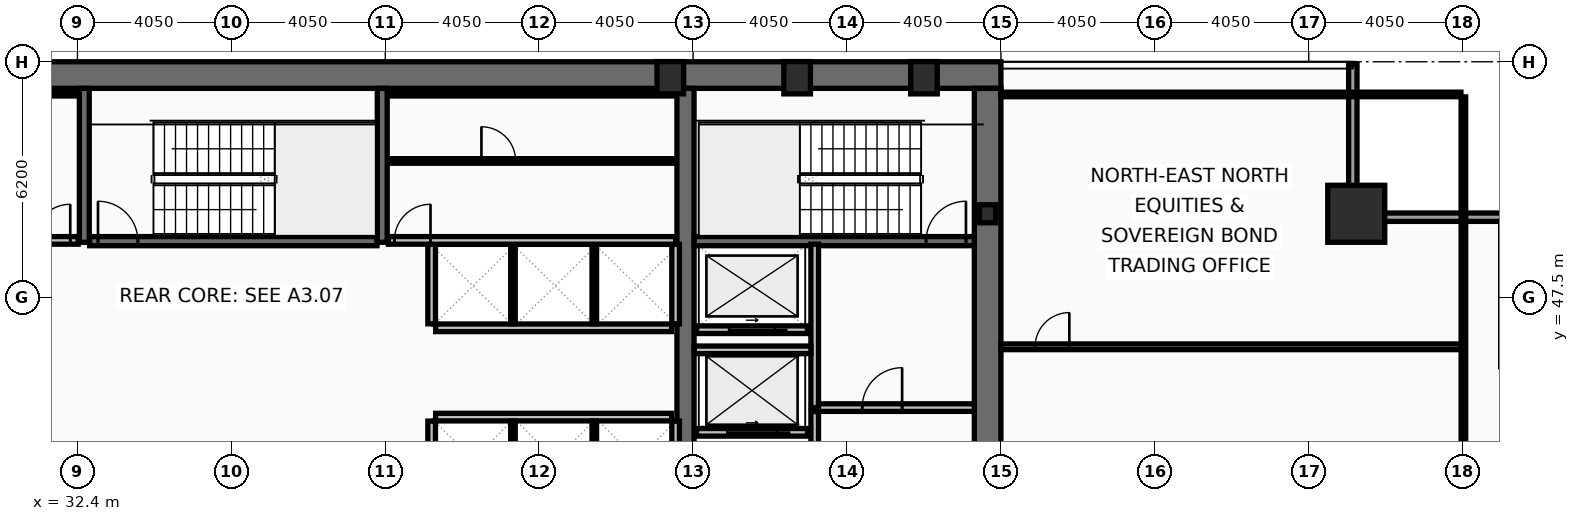
"""IFC4 building model, lengths in metres.
Left out: names, types, materials, properties, quantities, classifications, styles, units other than length and angle.
Written with IfcOpenShell. Run it as: python <this file> out.ifc"""

import sys

from ifc_helpers import new_model, si_unit, direction, frame, frame_2d, origin, origin_2d, place, context, subcontext, project, spatial, rectangle, hollow_rectangle, i_section, extrude, element, fill, save


model = new_model("IFC4")
c1 = context("Model", 3, precision=1e-05, world=origin(), true_north=direction((0.0, 1.0)))
c2 = subcontext(c1, "Body", "Model", "MODEL_VIEW")
j1 = project(units=[si_unit("LENGTHUNIT", "METRE"), si_unit("PLANEANGLEUNIT", "RADIAN")], contexts=[c1])
p1 = place(None, origin())
s1 = spatial("IfcSite", under=j1, at=p1, CompositionType="ELEMENT")
p2 = place(p1, origin())
s2 = spatial("IfcBuilding", under=s1, at=p2, CompositionType="ELEMENT")
p3 = place(p2, frame((0.0, 0.0, 90.6)))
s3 = spatial("IfcBuildingStorey", under=s2, at=p3, CompositionType="ELEMENT", Elevation=90.6)
p4 = place(p3, frame((16.2, 53.35, 0.0), z_axis=(0.0, 0.0, 1.0), x_axis=(1.0, 0.0, 0.0)))
e1 = element("IfcWall", 1, at=p4, inside=s3, PredefinedType="SHEAR", context=c2, shape_type="SweptSolid", body=[
    extrude(rectangle(XDim=40.5, YDim=0.7, at=frame_2d((20.25, 0.0))), origin(), (0.0, 0.0, 1.0), 3.82),
])
p5 = place(p3, frame((56.35, 53.0, 0.0), z_axis=(0.0, 0.0, 1.0), x_axis=(0.0, -1.0, 0.0)))
e2 = element("IfcWall", 2, at=p5, inside=s3, PredefinedType="SHEAR", context=c2, shape_type="SweptSolid", body=[
    extrude(rectangle(XDim=11.0, YDim=0.7, at=frame_2d((5.5, 0.0))), origin(), (0.0, 0.0, 1.0), 3.82),
])
p6 = place(p3, frame((48.4, 42.0, 0.0), z_axis=(0.0, 0.0, 1.0), x_axis=(0.0, 1.0, 0.0)))
e3 = element("IfcWall", 3, at=p6, inside=s3, PredefinedType="SHEAR", context=c2, shape_type="SweptSolid", body=[
    extrude(rectangle(XDim=11.0, YDim=0.45, at=frame_2d((5.5, 0.0))), origin(), (0.0, 0.0, 1.0), 3.82),
])
for number, where, z_axis, x_axis in (
    (4, (32.58, 48.95, 0.0), (0.0, 0.0, 1.0), (0.0, 1.0, 0.0)),
    (5, (40.42, 48.95, 0.0), (0.0, 0.0, 1.0), (0.0, 1.0, 0.0)),
):
    element("IfcWall", number, at=place(p3, frame(where, z_axis=z_axis, x_axis=x_axis)), inside=s3, PredefinedType="SHEAR", context=c2, shape_type="SweptSolid", body=[
        extrude(rectangle(XDim=4.05, YDim=0.26, at=frame_2d((2.025, 0.0))), origin(), (0.0, 0.0, 1.0), 3.82),
    ])
p7 = place(p3, frame((48.63, 48.98, 0.0), z_axis=(0.0, 0.0, 1.0), x_axis=(1.0, 0.0, 0.0)))
e6 = element("IfcWall", 6, at=p7, inside=s3, PredefinedType="SHEAR", context=c2, shape_type="SweptSolid", body=[
    extrude(rectangle(XDim=7.37, YDim=0.24, at=frame_2d((3.685, 0.0))), origin(), (0.0, 0.0, 1.0), 3.82),
])
p8 = place(p7, frame((6.1, 0.0, 0.0)))
e7 = element("IfcOpeningElement", 7, at=p8, cuts=e6, PredefinedType="OPENING", context=c2, shape_type="SweptSolid", body=[
    extrude(rectangle(XDim=1.05, YDim=2.15, at=frame_2d((0.525, 1.075))), frame((0.0, 0.13, 0.0), z_axis=(0.0, -1.0, 0.0), x_axis=(1.0, 0.0, 0.0)), (0.0, 0.0, 1.0), 0.26),
])
p9 = place(p3, frame((32.72, 48.98, 0.0), z_axis=(0.0, 0.0, 1.0), x_axis=(1.0, 0.0, 0.0)))
e8 = element("IfcWall", 8, at=p9, inside=s3, PredefinedType="SHEAR", context=c2, shape_type="SweptSolid", body=[
    extrude(rectangle(XDim=7.56, YDim=0.24, at=frame_2d((3.78, 0.0))), origin(), (0.0, 0.0, 1.0), 3.82),
])
p10 = place(p9, frame((0.22, 0.0, 0.0)))
e9 = element("IfcOpeningElement", 9, at=p10, cuts=e8, PredefinedType="OPENING", context=c2, shape_type="SweptSolid", body=[
    extrude(rectangle(XDim=1.05, YDim=2.15, at=frame_2d((0.525, 1.075))), frame((0.0, 0.13, 0.0), z_axis=(0.0, -1.0, 0.0), x_axis=(1.0, 0.0, 0.0)), (0.0, 0.0, 1.0), 0.26),
])
p11 = place(p3, frame((66.05, 49.7, 0.0), z_axis=(0.0, 0.0, 1.0), x_axis=(1.0, 0.0, 0.0)))
e10 = element("IfcColumn", 10, at=p11, inside=s3, PredefinedType="COLUMN", context=c2, shape_type="SweptSolid", body=[
    extrude(hollow_rectangle(XDim=1.5, YDim=1.5, WallThickness=0.07, at=origin_2d()), origin(), (0.0, 0.0, 1.0), 4.0),
])
for number, where, z_axis, x_axis in (
    (11, (48.0, 53.28, 0.0), (0.0, 0.0, 1.0), (1.0, 0.0, 0.0)),
    (12, (51.337, 53.28, 0.0), (0.0, 0.0, 1.0), (1.0, 0.0, 0.0)),
    (13, (54.675, 53.28, 0.0), (0.0, 0.0, 1.0), (1.0, 0.0, 0.0)),
):
    element("IfcColumn", number, at=place(p3, frame(where, z_axis=z_axis, x_axis=x_axis)), inside=s3, PredefinedType="COLUMN", context=c2, shape_type="SweptSolid", body=[
        extrude(hollow_rectangle(XDim=0.7, YDim=0.85, WallThickness=0.05, at=origin_2d()), origin(), (0.0, 0.0, 1.0), 4.0),
    ])
p12 = place(p3, frame((56.35, 49.7, 0.0), z_axis=(0.0, 0.0, 1.0), x_axis=(1.0, 0.0, 0.0)))
e14 = element("IfcColumn", 14, at=p12, inside=s3, PredefinedType="COLUMN", context=c2, shape_type="SweptSolid", body=[
    extrude(i_section(OverallWidth=0.424, OverallDepth=0.474, WebThickness=0.048, FlangeThickness=0.077, at=origin_2d()), origin(), (0.0, 0.0, 1.0), 4.0),
])
p13 = place(p3, frame((65.96, 53.63, 0.0), z_axis=(0.0, 0.0, 1.0), x_axis=(0.0, -1.0, 0.0)))
e15 = element("IfcWall", 15, at=p13, inside=s3, PredefinedType="SOLIDWALL", context=c2, shape_type="SweptSolid", body=[
    extrude(rectangle(XDim=3.91, YDim=0.22, at=frame_2d((1.955, 0.0))), origin(), (0.0, 0.0, 1.0), 3.16),
])
p14 = place(p3, frame((65.85, 49.61, 0.0), z_axis=(0.0, 0.0, 1.0), x_axis=(1.0, 0.0, 0.0)))
e16 = element("IfcWall", 16, at=p14, inside=s3, PredefinedType="SOLIDWALL", context=c2, shape_type="SweptSolid", body=[
    extrude(rectangle(XDim=4.22, YDim=0.22, at=frame_2d((2.11, 0.0))), origin(), (0.0, 0.0, 1.0), 3.16),
])
p15 = place(p3, frame((51.61, 43.95, 0.0), z_axis=(0.0, 0.0, 1.0), x_axis=(-1.0, 0.0, 0.0)))
e17 = element("IfcWall", 17, at=p15, inside=s3, PredefinedType="PARTITIONING", context=c2, shape_type="SweptSolid", body=[
    extrude(rectangle(XDim=2.92, YDim=0.2, at=frame_2d((1.46, 0.0))), origin(), (0.0, 0.0, 1.0), 3.82),
])
p16 = place(p15, frame((0.81, 0.0, 0.0)))
e18 = element("IfcOpeningElement", 18, at=p16, cuts=e17, PredefinedType="OPENING", context=c2, shape_type="SweptSolid", body=[
    extrude(rectangle(XDim=1.3, YDim=2.18, at=frame_2d((0.65, 1.09))), frame((0.0, 0.11, 0.0), z_axis=(0.0, -1.0, 0.0), x_axis=(1.0, 0.0, 0.0)), (0.0, 0.0, 1.0), 0.22),
])
p17 = place(p3, frame((51.61, 46.65, 0.0), z_axis=(0.0, 0.0, 1.0), x_axis=(-1.0, 0.0, 0.0)))
e19 = element("IfcWall", 19, at=p17, inside=s3, PredefinedType="PARTITIONING", context=c2, shape_type="SweptSolid", body=[
    extrude(rectangle(XDim=2.92, YDim=0.2, at=frame_2d((1.46, 0.0))), origin(), (0.0, 0.0, 1.0), 3.82),
])
p18 = place(p17, frame((0.86, 0.0, 0.0)))
e20 = element("IfcOpeningElement", 20, at=p18, cuts=e19, PredefinedType="OPENING", context=c2, shape_type="SweptSolid", body=[
    extrude(rectangle(XDim=1.2, YDim=2.18, at=frame_2d((0.6, 1.09))), frame((0.0, 0.11, 0.0), z_axis=(0.0, -1.0, 0.0), x_axis=(1.0, 0.0, 0.0)), (0.0, 0.0, 1.0), 0.22),
])
p19 = place(p3, frame((51.8, 44.6, 0.0), z_axis=(0.0, 0.0, 1.0), x_axis=(0.0, 1.0, 0.0)))
e21 = element("IfcWall", 21, at=p19, inside=s3, PredefinedType="PARTITIONING", context=c2, shape_type="SweptSolid", body=[
    extrude(rectangle(XDim=4.3, YDim=0.2, at=frame_2d((2.15, 0.0))), origin(), (0.0, 0.0, 1.0), 3.82),
])
p20 = place(p3, frame((51.9, 44.6, 0.0), z_axis=(0.0, 0.0, 1.0), x_axis=(1.0, 0.0, 0.0)))
e22 = element("IfcWall", 22, at=p20, inside=s3, PredefinedType="PARTITIONING", context=c2, shape_type="SweptSolid", body=[
    extrude(rectangle(XDim=4.1, YDim=0.2, at=frame_2d((2.05, 0.0))), origin(), (0.0, 0.0, 1.0), 3.82),
])
p21 = place(p20, frame((1.15, 0.0, 0.0)))
e23 = element("IfcOpeningElement", 23, at=p21, cuts=e22, PredefinedType="OPENING", context=c2, shape_type="SweptSolid", body=[
    extrude(rectangle(XDim=1.05, YDim=2.15, at=frame_2d((0.525, 1.075))), frame((0.0, 0.11, 0.0), z_axis=(0.0, -1.0, 0.0), x_axis=(1.0, 0.0, 0.0)), (0.0, 0.0, 1.0), 0.22),
])
p22 = place(p3, frame((48.63, 46.12, 0.0), z_axis=(0.0, 0.0, 1.0), x_axis=(1.0, 0.0, 0.0)))
e24 = element("IfcWall", 24, at=p22, inside=s3, PredefinedType="PARTITIONING", context=c2, shape_type="SweptSolid", body=[
    extrude(rectangle(XDim=3.07, YDim=0.2, at=frame_2d((1.535, 0.0))), origin(), (0.0, 0.0, 1.0), 3.82),
])
p23 = place(p3, frame((51.8, 42.0, 0.0), z_axis=(0.0, 0.0, 1.0), x_axis=(0.0, 1.0, 0.0)))
e25 = element("IfcWall", 25, at=p23, inside=s3, PredefinedType="PARTITIONING", context=c2, shape_type="SweptSolid", body=[
    extrude(rectangle(XDim=2.495, YDim=0.2, at=frame_2d((1.248, 0.0))), origin(), (0.0, 0.0, 1.0), 3.82),
])
p24 = place(p23, frame((0.38, 0.0, 0.0)))
e26 = element("IfcOpeningElement", 26, at=p24, cuts=e25, PredefinedType="OPENING", context=c2, shape_type="SweptSolid", body=[
    extrude(rectangle(XDim=1.05, YDim=2.15, at=frame_2d((0.525, 1.075))), frame((0.0, 0.11, 0.0), z_axis=(0.0, -1.0, 0.0), x_axis=(1.0, 0.0, 0.0)), (0.0, 0.0, 1.0), 0.22),
])
p25 = place(p3, frame((41.825, 46.7, 0.0), z_axis=(0.0, 0.0, 1.0), x_axis=(1.0, 0.0, 0.0)))
e27 = element("IfcWall", 27, at=p25, inside=s3, PredefinedType="PARTITIONING", context=c2, shape_type="SweptSolid", body=[
    extrude(rectangle(XDim=6.21, YDim=0.2, at=frame_2d((3.105, 0.0))), origin(), (0.0, 0.0, 1.0), 3.82),
])
for number, where, z_axis, x_axis in (
    (28, (41.72, 46.805, 0.0), (0.0, 0.0, 1.0), (0.0, 1.0, 0.0)),
    (29, (48.14, 46.805, 0.0), (0.0, 0.0, 1.0), (0.0, 1.0, 0.0)),
):
    element("IfcWall", number, at=place(p3, frame(where, z_axis=z_axis, x_axis=x_axis)), inside=s3, PredefinedType="PARTITIONING", context=c2, shape_type="SweptSolid", body=[
        extrude(rectangle(XDim=2.09, YDim=0.2, at=frame_2d((1.045, 0.0))), origin(), (0.0, 0.0, 1.0), 3.82),
    ])
for number, where, z_axis, x_axis in (
    (30, (43.86, 46.805, 0.0), (0.0, 0.0, 1.0), (0.0, 1.0, 0.0)),
    (31, (46.0, 46.805, 0.0), (0.0, 0.0, 1.0), (0.0, 1.0, 0.0)),
):
    element("IfcWall", number, at=place(p3, frame(where, z_axis=z_axis, x_axis=x_axis)), inside=s3, PredefinedType="PARTITIONING", context=c2, shape_type="SweptSolid", body=[
        extrude(rectangle(XDim=2.09, YDim=0.12, at=frame_2d((1.045, 0.0))), origin(), (0.0, 0.0, 1.0), 3.82),
    ])
p26 = place(p3, frame((41.825, 44.35, 0.0), z_axis=(0.0, 0.0, 1.0), x_axis=(1.0, 0.0, 0.0)))
e32 = element("IfcWall", 32, at=p26, inside=s3, PredefinedType="PARTITIONING", context=c2, shape_type="SweptSolid", body=[
    extrude(rectangle(XDim=6.21, YDim=0.2, at=frame_2d((3.105, 0.0))), origin(), (0.0, 0.0, 1.0), 3.82),
])
for number, where, z_axis, x_axis in (
    (33, (41.72, 42.05, 0.0), (0.0, 0.0, 1.0), (0.0, 1.0, 0.0)),
    (34, (48.14, 42.05, 0.0), (0.0, 0.0, 1.0), (0.0, 1.0, 0.0)),
):
    element("IfcWall", number, at=place(p3, frame(where, z_axis=z_axis, x_axis=x_axis)), inside=s3, PredefinedType="PARTITIONING", context=c2, shape_type="SweptSolid", body=[
        extrude(rectangle(XDim=2.195, YDim=0.2, at=frame_2d((1.098, 0.0))), origin(), (0.0, 0.0, 1.0), 3.82),
    ])
for number, where, z_axis, x_axis in (
    (35, (43.86, 42.05, 0.0), (0.0, 0.0, 1.0), (0.0, 1.0, 0.0)),
    (36, (46.0, 42.05, 0.0), (0.0, 0.0, 1.0), (0.0, 1.0, 0.0)),
):
    element("IfcWall", number, at=place(p3, frame(where, z_axis=z_axis, x_axis=x_axis)), inside=s3, PredefinedType="PARTITIONING", context=c2, shape_type="SweptSolid", body=[
        extrude(rectangle(XDim=2.195, YDim=0.12, at=frame_2d((1.098, 0.0))), origin(), (0.0, 0.0, 1.0), 3.82),
    ])
p27 = place(p3, frame((24.7, 52.86, 0.0), z_axis=(0.0, 0.0, 1.0), x_axis=(1.0, 0.0, 0.0)))
e37 = element("IfcWall", 37, at=p27, inside=s3, PredefinedType="PARTITIONING", context=c2, shape_type="SweptSolid", body=[
    extrude(rectangle(XDim=7.72, YDim=0.12, at=frame_2d((3.86, 0.0))), origin(), (0.0, 0.0, 1.0), 3.82),
])
p28 = place(p3, frame((24.7, 49.0, 0.0), z_axis=(0.0, 0.0, 1.0), x_axis=(1.0, 0.0, 0.0)))
e38 = element("IfcWall", 38, at=p28, inside=s3, PredefinedType="PARTITIONING", context=c2, shape_type="SweptSolid", body=[
    extrude(rectangle(XDim=7.72, YDim=0.2, at=frame_2d((3.86, 0.0))), origin(), (0.0, 0.0, 1.0), 3.82),
])
p29 = place(p28, frame((6.56, 0.0, 0.0)))
e39 = element("IfcOpeningElement", 39, at=p29, cuts=e38, PredefinedType="OPENING", context=c2, shape_type="SweptSolid", body=[
    extrude(rectangle(XDim=0.95, YDim=2.1, at=frame_2d((0.475, 1.05))), frame((0.0, 0.11, 0.0), z_axis=(0.0, -1.0, 0.0), x_axis=(1.0, 0.0, 0.0)), (0.0, 0.0, 1.0), 0.22),
])
p30 = place(p3, frame((40.58, 52.86, 0.0), z_axis=(0.0, 0.0, 1.0), x_axis=(1.0, 0.0, 0.0)))
e40 = element("IfcWall", 40, at=p30, inside=s3, PredefinedType="PARTITIONING", context=c2, shape_type="SweptSolid", body=[
    extrude(rectangle(XDim=7.56, YDim=0.12, at=frame_2d((3.78, 0.0))), origin(), (0.0, 0.0, 1.0), 3.82),
])
p31 = place(p3, frame((40.58, 49.0, 0.0), z_axis=(0.0, 0.0, 1.0), x_axis=(1.0, 0.0, 0.0)))
e41 = element("IfcWall", 41, at=p31, inside=s3, PredefinedType="PARTITIONING", context=c2, shape_type="SweptSolid", body=[
    extrude(rectangle(XDim=7.56, YDim=0.2, at=frame_2d((3.78, 0.0))), origin(), (0.0, 0.0, 1.0), 3.82),
])
p32 = place(p31, frame((0.16, 0.0, 0.0)))
e42 = element("IfcOpeningElement", 42, at=p32, cuts=e41, PredefinedType="OPENING", context=c2, shape_type="SweptSolid", body=[
    extrude(rectangle(XDim=0.95, YDim=2.1, at=frame_2d((0.475, 1.05))), frame((0.0, 0.11, 0.0), z_axis=(0.0, -1.0, 0.0), x_axis=(1.0, 0.0, 0.0)), (0.0, 0.0, 1.0), 0.22),
])
p33 = place(p3, frame((40.63, 51.09, 0.0), z_axis=(0.0, 0.0, 1.0), x_axis=(1.0, 0.0, 0.0)))
e43 = element("IfcWall", 43, at=p33, inside=s3, PredefinedType="PARTITIONING", context=c2, shape_type="SweptSolid", body=[
    extrude(rectangle(XDim=7.46, YDim=0.12, at=frame_2d((3.73, 0.0))), origin(), (0.0, 0.0, 1.0), 3.82),
])
p34 = place(p33, frame((2.4, 0.0, 0.0)))
e44 = element("IfcOpeningElement", 44, at=p34, cuts=e43, PredefinedType="OPENING", context=c2, shape_type="SweptSolid", body=[
    extrude(rectangle(XDim=0.9, YDim=2.05, at=frame_2d((0.45, 1.025))), frame((0.0, 0.07, 0.0), z_axis=(0.0, -1.0, 0.0), x_axis=(1.0, 0.0, 0.0)), (0.0, 0.0, 1.0), 0.14),
])
p35 = place(p3, frame((56.7, 46.2, 0.0), z_axis=(0.0, 0.0, 1.0), x_axis=(1.0, 0.0, 0.0)))
e45 = element("IfcWall", 45, at=p35, inside=s3, PredefinedType="PARTITIONING", context=c2, shape_type="SweptSolid", body=[
    extrude(rectangle(XDim=12.105, YDim=0.15, at=frame_2d((6.052, 0.0))), origin(), (0.0, 0.0, 1.0), 3.16),
])
p36 = place(p35, frame((0.9, 0.0, 0.0)))
e46 = element("IfcOpeningElement", 46, at=p36, cuts=e45, PredefinedType="OPENING", context=c2, shape_type="SweptSolid", body=[
    extrude(rectangle(XDim=0.9, YDim=2.05, at=frame_2d((0.45, 1.025))), frame((0.0, 0.085, 0.0), z_axis=(0.0, -1.0, 0.0), x_axis=(1.0, 0.0, 0.0)), (0.0, 0.0, 1.0), 0.17),
])
p37 = place(p3, frame((68.87, 10.665, 0.0), z_axis=(0.0, 0.0, 1.0), x_axis=(0.0, 1.0, 0.0)))
e47 = element("IfcWall", 47, at=p37, inside=s3, PredefinedType="PARTITIONING", context=c2, shape_type="SweptSolid", body=[
    extrude(rectangle(XDim=42.11, YDim=0.12, at=frame_2d((21.055, 0.0))), origin(), (0.0, 0.0, 1.0), 3.01),
])
p38 = place(p3, frame((56.7, 52.84, 0.0), z_axis=(0.0, 0.0, 1.0), x_axis=(1.0, 0.0, 0.0)))
e48 = element("IfcWall", 48, at=p38, inside=s3, PredefinedType="PARTITIONING", context=c2, shape_type="SweptSolid", body=[
    extrude(rectangle(XDim=12.105, YDim=0.12, at=frame_2d((6.052, 0.0))), origin(), (0.0, 0.0, 1.0), 3.82),
])
p39 = place(p8, origin())
e49 = element("IfcDoor", 49, at=p39, inside=s3, OperationType="SINGLE_SWING_RIGHT", PredefinedType="DOOR", context=c2, shape_type="SweptSolid", body=[
    extrude(rectangle(XDim=1.05, YDim=2.15, at=frame_2d((0.525, 1.075))), frame((0.0, 0.025, 0.0), z_axis=(0.0, -1.0, 0.0), x_axis=(1.0, 0.0, 0.0)), (0.0, 0.0, 1.0), 0.05),
])
fill(e7, e49)
p40 = place(p10, origin())
e50 = element("IfcDoor", 50, at=p40, inside=s3, OperationType="SINGLE_SWING_LEFT", PredefinedType="DOOR", context=c2, shape_type="SweptSolid", body=[
    extrude(rectangle(XDim=1.05, YDim=2.15, at=frame_2d((0.525, 1.075))), frame((0.0, 0.025, 0.0), z_axis=(0.0, -1.0, 0.0), x_axis=(1.0, 0.0, 0.0)), (0.0, 0.0, 1.0), 0.05),
])
fill(e9, e50)
p41 = place(p16, origin())
e51 = element("IfcDoor", 51, at=p41, inside=s3, OperationType="SLIDING_TO_LEFT", PredefinedType="DOOR", context=c2, shape_type="SweptSolid", body=[
    extrude(rectangle(XDim=1.3, YDim=2.18, at=frame_2d((0.65, 1.09))), frame((0.0, 0.025, 0.0), z_axis=(0.0, -1.0, 0.0), x_axis=(1.0, 0.0, 0.0)), (0.0, 0.0, 1.0), 0.05),
])
fill(e18, e51)
p42 = place(p18, origin())
e52 = element("IfcDoor", 52, at=p42, inside=s3, OperationType="SLIDING_TO_LEFT", PredefinedType="DOOR", context=c2, shape_type="SweptSolid", body=[
    extrude(rectangle(XDim=1.2, YDim=2.18, at=frame_2d((0.6, 1.09))), frame((0.0, 0.025, 0.0), z_axis=(0.0, -1.0, 0.0), x_axis=(1.0, 0.0, 0.0)), (0.0, 0.0, 1.0), 0.05),
])
fill(e20, e52)
p43 = place(p21, origin())
e53 = element("IfcDoor", 53, at=p43, inside=s3, OperationType="SINGLE_SWING_RIGHT", PredefinedType="DOOR", context=c2, shape_type="SweptSolid", body=[
    extrude(rectangle(XDim=1.05, YDim=2.15, at=frame_2d((0.525, 1.075))), frame((0.0, 0.025, 0.0), z_axis=(0.0, -1.0, 0.0), x_axis=(1.0, 0.0, 0.0)), (0.0, 0.0, 1.0), 0.05),
])
fill(e23, e53)
p44 = place(p29, origin())
e54 = element("IfcDoor", 54, at=p44, inside=s3, OperationType="SINGLE_SWING_RIGHT", PredefinedType="DOOR", context=c2, shape_type="SweptSolid", body=[
    extrude(rectangle(XDim=0.95, YDim=2.1, at=frame_2d((0.475, 1.05))), frame((0.0, 0.025, 0.0), z_axis=(0.0, -1.0, 0.0), x_axis=(1.0, 0.0, 0.0)), (0.0, 0.0, 1.0), 0.05),
])
fill(e39, e54)
p45 = place(p32, origin())
e55 = element("IfcDoor", 55, at=p45, inside=s3, OperationType="SINGLE_SWING_RIGHT", PredefinedType="DOOR", context=c2, shape_type="SweptSolid", body=[
    extrude(rectangle(XDim=0.95, YDim=2.1, at=frame_2d((0.475, 1.05))), frame((0.0, 0.025, 0.0), z_axis=(0.0, -1.0, 0.0), x_axis=(1.0, 0.0, 0.0)), (0.0, 0.0, 1.0), 0.05),
])
fill(e42, e55)
p46 = place(p34, origin())
e56 = element("IfcDoor", 56, at=p46, inside=s3, OperationType="SINGLE_SWING_LEFT", PredefinedType="DOOR", context=c2, shape_type="SweptSolid", body=[
    extrude(rectangle(XDim=0.9, YDim=2.05, at=frame_2d((0.45, 1.025))), frame((0.0, 0.025, 0.0), z_axis=(0.0, -1.0, 0.0), x_axis=(1.0, 0.0, 0.0)), (0.0, 0.0, 1.0), 0.05),
])
fill(e44, e56)
p47 = place(p36, origin())
e57 = element("IfcDoor", 57, at=p47, inside=s3, OperationType="SINGLE_SWING_RIGHT", PredefinedType="DOOR", context=c2, shape_type="SweptSolid", body=[
    extrude(rectangle(XDim=0.9, YDim=2.05, at=frame_2d((0.45, 1.025))), frame((0.0, 0.025, 0.0), z_axis=(0.0, -1.0, 0.0), x_axis=(1.0, 0.0, 0.0)), (0.0, 0.0, 1.0), 0.05),
])
fill(e46, e57)
save(model, sys.argv[1])
